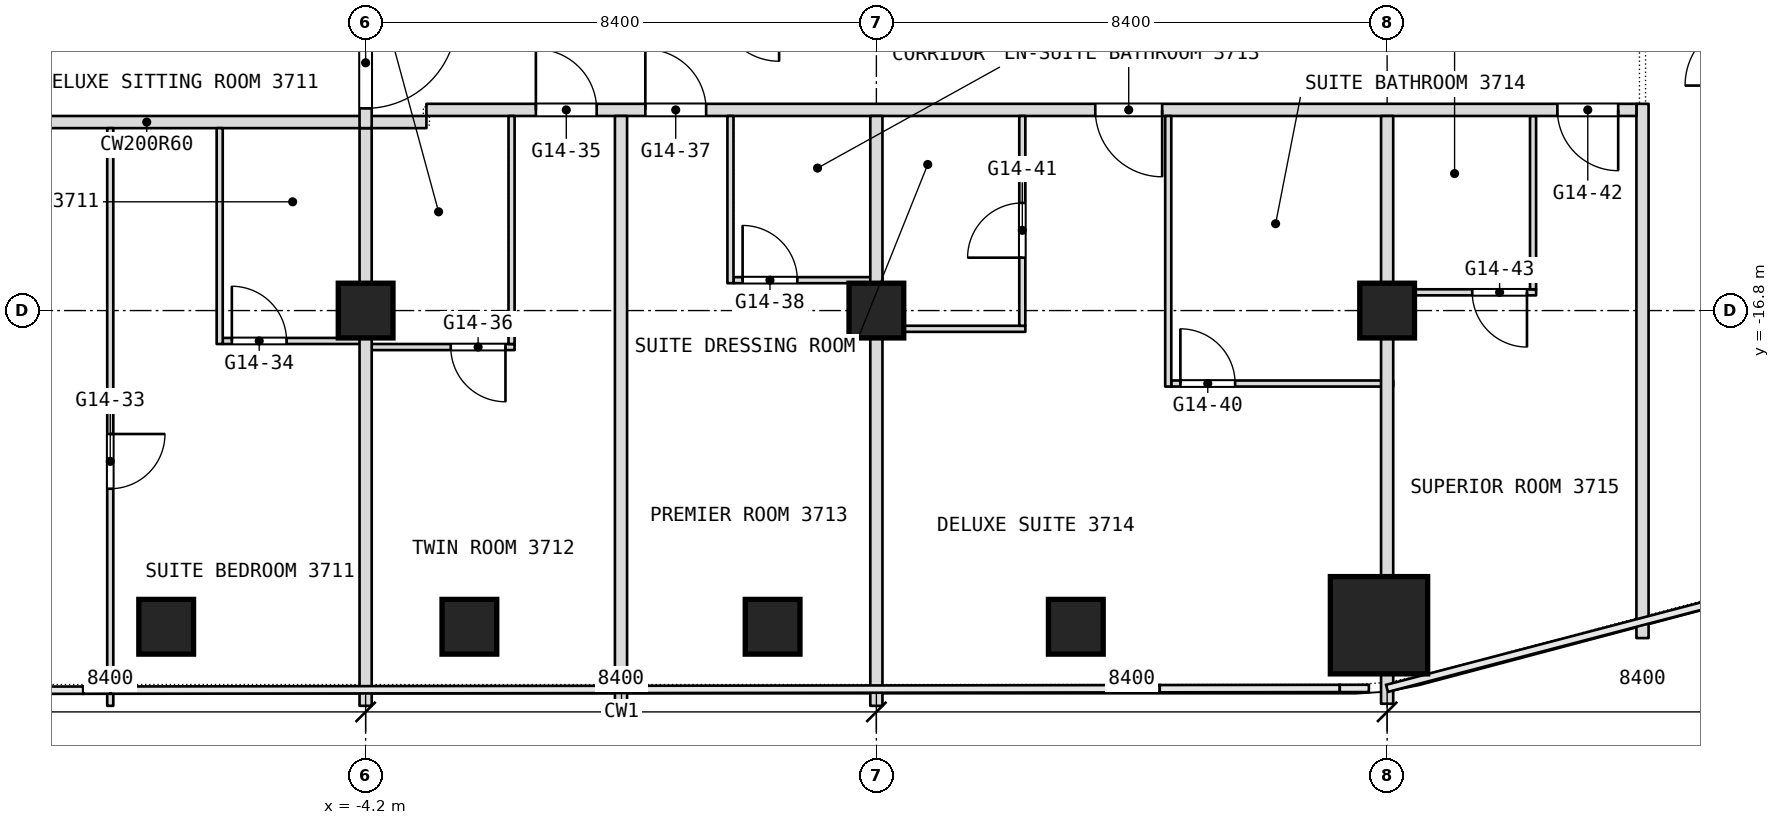
"""IFC4 building model, lengths in metres.
Left out: names, types, materials, properties, quantities, classifications, styles, units other than length and angle.
Written with IfcOpenShell. Run it as: python <this file> out.ifc"""

import sys

from ifc_helpers import new_model, si_unit, direction, frame, frame_2d, origin, origin_2d, place, context, subcontext, project, spatial, rectangle, extrude, element, fill, save


model = new_model("IFC4")
c1 = context("Model", 3, precision=1e-05, world=origin(), true_north=direction((0.0, 1.0)))
c2 = subcontext(c1, "Body", "Model", "MODEL_VIEW")
j1 = project(units=[si_unit("LENGTHUNIT", "METRE"), si_unit("PLANEANGLEUNIT", "RADIAN")], contexts=[c1])
p1 = place(None, origin())
s1 = spatial("IfcSite", under=j1, at=p1, CompositionType="ELEMENT")
p2 = place(p1, origin())
s2 = spatial("IfcBuilding", under=s1, at=p2, CompositionType="ELEMENT")
p3 = place(p2, frame((0.0, 0.0, 158.9)))
s3 = spatial("IfcBuildingStorey", under=s2, at=p3, CompositionType="ELEMENT", Elevation=158.9)
p4 = place(p3, frame((12.466, -21.975, 0.0), z_axis=(0.0, 0.0, 1.0), x_axis=(1.0, 0.0, 0.0)))
e1 = element("IfcColumn", 1, at=p4, inside=s3, PredefinedType="COLUMN", context=c2, shape_type="SweptSolid", body=[
    extrude(rectangle(XDim=1.6, YDim=1.6, at=origin_2d()), origin(), (0.0, 0.0, 1.0), 3.6),
])
for number, where, z_axis, x_axis in (
    (2, (-4.2, -16.8, 0.0), (0.0, 0.0, 1.0), (1.0, 0.0, 0.0)),
    (3, (4.2, -16.8, 0.0), (0.0, 0.0, 1.0), (1.0, 0.0, 0.0)),
    (4, (12.6, -16.8, 0.0), (0.0, 0.0, 1.0), (1.0, 0.0, 0.0)),
    (5, (7.48, -22.0, 0.0), (0.0, 0.0, 1.0), (1.0, 0.0, 0.0)),
    (6, (2.493, -22.0, 0.0), (0.0, 0.0, 1.0), (1.0, 0.0, 0.0)),
    (7, (-2.493, -22.0, 0.0), (0.0, 0.0, 1.0), (1.0, 0.0, 0.0)),
    (8, (-7.48, -22.0, 0.0), (0.0, 0.0, 1.0), (1.0, 0.0, 0.0)),
):
    element("IfcColumn", number, at=place(p3, frame(where, z_axis=z_axis, x_axis=x_axis)), inside=s3, PredefinedType="COLUMN", context=c2, shape_type="SweptSolid", body=[
        extrude(rectangle(XDim=0.9, YDim=0.9, at=origin_2d()), origin(), (0.0, 0.0, 1.0), 3.6),
    ])
p5 = place(p3, frame((9.05, -18.0, 0.0), z_axis=(0.0, 0.0, 1.0), x_axis=(1.0, 0.0, 0.0)))
e9 = element("IfcWall", 9, at=p5, inside=s3, PredefinedType="PARTITIONING", context=c2, shape_type="SweptSolid", body=[
    extrude(rectangle(XDim=3.65, YDim=0.1, at=frame_2d((1.825, 0.0))), origin(), (0.0, 0.0, 1.0), 3.34),
])
p6 = place(p5, frame((0.15, 0.0, 0.0)))
e10 = element("IfcOpeningElement", 10, at=p6, cuts=e9, PredefinedType="OPENING", context=c2, shape_type="SweptSolid", body=[
    extrude(rectangle(XDim=0.9, YDim=2.1, at=frame_2d((0.45, 1.05))), frame((0.0, 0.05, 0.0), z_axis=(0.0, -1.0, 0.0), x_axis=(1.0, 0.0, 0.0)), (0.0, 0.0, 1.0), 0.1),
])
p7 = place(p3, frame((-4.1, -17.4, 0.0), z_axis=(0.0, 0.0, 1.0), x_axis=(1.0, 0.0, 0.0)))
e11 = element("IfcWall", 11, at=p7, inside=s3, PredefinedType="PARTITIONING", context=c2, shape_type="SweptSolid", body=[
    extrude(rectangle(XDim=2.35, YDim=0.1, at=frame_2d((1.175, 0.0))), origin(), (0.0, 0.0, 1.0), 3.34),
])
p8 = place(p7, frame((1.3, 0.0, 0.0)))
e12 = element("IfcOpeningElement", 12, at=p8, cuts=e11, PredefinedType="OPENING", context=c2, shape_type="SweptSolid", body=[
    extrude(rectangle(XDim=0.9, YDim=2.1, at=frame_2d((0.45, 1.05))), frame((0.0, 0.05, 0.0), z_axis=(0.0, -1.0, 0.0), x_axis=(1.0, 0.0, 0.0)), (0.0, 0.0, 1.0), 0.1),
])
p9 = place(p3, frame((-6.55, -17.3, 0.0), z_axis=(0.0, 0.0, 1.0), x_axis=(1.0, 0.0, 0.0)))
e13 = element("IfcWall", 13, at=p9, inside=s3, PredefinedType="PARTITIONING", context=c2, shape_type="SweptSolid", body=[
    extrude(rectangle(XDim=2.45, YDim=0.1, at=frame_2d((1.225, 0.0))), origin(), (0.0, 0.0, 1.0), 3.34),
])
p10 = place(p9, frame((0.15, 0.0, 0.0)))
e14 = element("IfcOpeningElement", 14, at=p10, cuts=e13, PredefinedType="OPENING", context=c2, shape_type="SweptSolid", body=[
    extrude(rectangle(XDim=0.9, YDim=2.1, at=frame_2d((0.45, 1.05))), frame((0.0, 0.05, 0.0), z_axis=(0.0, -1.0, 0.0), x_axis=(1.0, 0.0, 0.0)), (0.0, 0.0, 1.0), 0.1),
])
p11 = place(p3, frame((4.3, -17.1, 0.0), z_axis=(0.0, 0.0, 1.0), x_axis=(1.0, 0.0, 0.0)))
e15 = element("IfcWall", 15, at=p11, inside=s3, PredefinedType="PARTITIONING", context=c2, shape_type="SweptSolid", body=[
    extrude(rectangle(XDim=2.35, YDim=0.1, at=frame_2d((1.175, 0.0))), origin(), (0.0, 0.0, 1.0), 3.34),
])
p12 = place(p3, frame((16.8, -22.186, 0.0), z_axis=(0.0, 0.0, 1.0), x_axis=(0.0, 1.0, 0.0)))
e16 = element("IfcWall", 16, at=p12, inside=s3, PredefinedType="PARTITIONING", context=c2, shape_type="SweptSolid", body=[
    extrude(rectangle(XDim=8.786, YDim=0.2, at=frame_2d((4.393, 0.0))), origin(), (0.0, 0.0, 1.0), 3.34),
])
p13 = place(p3, frame((12.7, -16.5, 0.0), z_axis=(0.0, 0.0, 1.0), x_axis=(1.0, 0.0, 0.0)))
e17 = element("IfcWall", 17, at=p13, inside=s3, PredefinedType="PARTITIONING", context=c2, shape_type="SweptSolid", body=[
    extrude(rectangle(XDim=2.35, YDim=0.1, at=frame_2d((1.175, 0.0))), origin(), (0.0, 0.0, 1.0), 3.34),
])
p14 = place(p13, frame((1.3, 0.0, 0.0)))
e18 = element("IfcOpeningElement", 18, at=p14, cuts=e17, PredefinedType="OPENING", context=c2, shape_type="SweptSolid", body=[
    extrude(rectangle(XDim=0.9, YDim=2.1, at=frame_2d((0.45, 1.05))), frame((0.0, 0.05, 0.0), z_axis=(0.0, -1.0, 0.0), x_axis=(1.0, 0.0, 0.0)), (0.0, 0.0, 1.0), 0.1),
])
p15 = place(p3, frame((1.85, -16.3, 0.0), z_axis=(0.0, 0.0, 1.0), x_axis=(1.0, 0.0, 0.0)))
e19 = element("IfcWall", 19, at=p15, inside=s3, PredefinedType="PARTITIONING", context=c2, shape_type="SweptSolid", body=[
    extrude(rectangle(XDim=2.45, YDim=0.1, at=frame_2d((1.225, 0.0))), origin(), (0.0, 0.0, 1.0), 3.34),
])
p16 = place(p15, frame((0.15, 0.0, 0.0)))
e20 = element("IfcOpeningElement", 20, at=p16, cuts=e19, PredefinedType="OPENING", context=c2, shape_type="SweptSolid", body=[
    extrude(rectangle(XDim=0.9, YDim=2.1, at=frame_2d((0.45, 1.05))), frame((0.0, 0.05, 0.0), z_axis=(0.0, -1.0, 0.0), x_axis=(1.0, 0.0, 0.0)), (0.0, 0.0, 1.0), 0.1),
])
p17 = place(p3, frame((15.0, -16.45, 0.0), z_axis=(0.0, 0.0, 1.0), x_axis=(0.0, 1.0, 0.0)))
e21 = element("IfcWall", 21, at=p17, inside=s3, PredefinedType="PARTITIONING", context=c2, shape_type="SweptSolid", body=[
    extrude(rectangle(XDim=2.85, YDim=0.1, at=frame_2d((1.425, 0.0))), origin(), (0.0, 0.0, 1.0), 3.34),
])
p18 = place(p3, frame((-12.4, -13.7, 0.0), z_axis=(0.0, 0.0, 1.0), x_axis=(1.0, 0.0, 0.0)))
e22 = element("IfcWall", 22, at=p18, inside=s3, PredefinedType="PARTITIONING", context=c2, shape_type="SweptSolid", body=[
    extrude(rectangle(XDim=9.2, YDim=0.2, at=frame_2d((4.6, 0.0))), origin(), (0.0, 0.0, 1.0), 3.34),
])
p19 = place(p18, frame((1.35, 0.0, 0.0)))
e23 = element("IfcOpeningElement", 23, at=p19, cuts=e22, PredefinedType="OPENING", context=c2, shape_type="SweptSolid", body=[
    extrude(rectangle(XDim=1.1, YDim=2.1, at=frame_2d((0.55, 1.05))), frame((0.0, 0.1, 0.0), z_axis=(0.0, -1.0, 0.0), x_axis=(1.0, 0.0, 0.0)), (0.0, 0.0, 1.0), 0.2),
])
p20 = place(p3, frame((-3.2, -13.5, 0.0), z_axis=(0.0, 0.0, 1.0), x_axis=(1.0, 0.0, 0.0)))
e24 = element("IfcWall", 24, at=p20, inside=s3, PredefinedType="PARTITIONING", context=c2, shape_type="SweptSolid", body=[
    extrude(rectangle(XDim=19.9, YDim=0.2, at=frame_2d((9.95, 0.0))), origin(), (0.0, 0.0, 1.0), 3.34),
])
p21 = place(p20, frame((1.8, 0.0, 0.0)))
e25 = element("IfcOpeningElement", 25, at=p21, cuts=e24, PredefinedType="OPENING", context=c2, shape_type="SweptSolid", body=[
    extrude(rectangle(XDim=1.0, YDim=2.1, at=frame_2d((0.5, 1.05))), frame((0.0, 0.1, 0.0), z_axis=(0.0, -1.0, 0.0), x_axis=(1.0, 0.0, 0.0)), (0.0, 0.0, 1.0), 0.2),
])
p22 = place(p20, frame((3.6, 0.0, 0.0)))
e26 = element("IfcOpeningElement", 26, at=p22, cuts=e24, PredefinedType="OPENING", context=c2, shape_type="SweptSolid", body=[
    extrude(rectangle(XDim=1.0, YDim=2.1, at=frame_2d((0.5, 1.05))), frame((0.0, 0.1, 0.0), z_axis=(0.0, -1.0, 0.0), x_axis=(1.0, 0.0, 0.0)), (0.0, 0.0, 1.0), 0.2),
])
p23 = place(p20, frame((11.0, 0.0, 0.0)))
e27 = element("IfcOpeningElement", 27, at=p23, cuts=e24, PredefinedType="OPENING", context=c2, shape_type="SweptSolid", body=[
    extrude(rectangle(XDim=1.1, YDim=2.1, at=frame_2d((0.55, 1.05))), frame((0.0, 0.1, 0.0), z_axis=(0.0, -1.0, 0.0), x_axis=(1.0, 0.0, 0.0)), (0.0, 0.0, 1.0), 0.2),
])
p24 = place(p20, frame((18.6, 0.0, 0.0)))
e28 = element("IfcOpeningElement", 28, at=p24, cuts=e24, PredefinedType="OPENING", context=c2, shape_type="SweptSolid", body=[
    extrude(rectangle(XDim=1.0, YDim=2.1, at=frame_2d((0.5, 1.05))), frame((0.0, 0.1, 0.0), z_axis=(0.0, -1.0, 0.0), x_axis=(1.0, 0.0, 0.0)), (0.0, 0.0, 1.0), 0.2),
])
p25 = place(p3, frame((12.6, -23.266, 0.0), z_axis=(0.0, 0.0, 1.0), x_axis=(0.0, 1.0, 0.0)))
e29 = element("IfcWall", 29, at=p25, inside=s3, PredefinedType="PARTITIONING", context=c2, shape_type="SweptSolid", body=[
    extrude(rectangle(XDim=0.491, YDim=0.2, at=frame_2d((0.246, 0.0))), origin(), (0.0, 0.0, 1.0), 3.34),
])
p26 = place(p3, frame((12.6, -21.175, 0.0), z_axis=(0.0, 0.0, 1.0), x_axis=(0.0, 1.0, 0.0)))
e30 = element("IfcWall", 30, at=p26, inside=s3, PredefinedType="PARTITIONING", context=c2, shape_type="SweptSolid", body=[
    extrude(rectangle(XDim=7.575, YDim=0.2, at=frame_2d((3.788, 0.0))), origin(), (0.0, 0.0, 1.0), 3.34),
])
p27 = place(p3, frame((9.0, -18.05, 0.0), z_axis=(0.0, 0.0, 1.0), x_axis=(0.0, 1.0, 0.0)))
e31 = element("IfcWall", 31, at=p27, inside=s3, PredefinedType="PARTITIONING", context=c2, shape_type="SweptSolid", body=[
    extrude(rectangle(XDim=4.45, YDim=0.1, at=frame_2d((2.225, 0.0))), origin(), (0.0, 0.0, 1.0), 3.34),
])
p28 = place(p3, frame((6.6, -17.05, 0.0), z_axis=(0.0, 0.0, 1.0), x_axis=(0.0, 1.0, 0.0)))
e32 = element("IfcWall", 32, at=p28, inside=s3, PredefinedType="PARTITIONING", context=c2, shape_type="SweptSolid", body=[
    extrude(rectangle(XDim=3.45, YDim=0.1, at=frame_2d((1.725, 0.0))), origin(), (0.0, 0.0, 1.0), 3.34),
])
p29 = place(p28, frame((1.12, 0.0, 0.0)))
e33 = element("IfcOpeningElement", 33, at=p29, cuts=e32, PredefinedType="OPENING", context=c2, shape_type="SweptSolid", body=[
    extrude(rectangle(XDim=0.9, YDim=2.1, at=frame_2d((0.45, 1.05))), frame((0.0, 0.05, 0.0), z_axis=(0.0, -1.0, 0.0), x_axis=(1.0, 0.0, 0.0)), (0.0, 0.0, 1.0), 0.1),
])
p30 = place(p3, frame((4.2, -23.3, 0.0), z_axis=(0.0, 0.0, 1.0), x_axis=(0.0, 1.0, 0.0)))
e34 = element("IfcWall", 34, at=p30, inside=s3, PredefinedType="PARTITIONING", context=c2, shape_type="SweptSolid", body=[
    extrude(rectangle(XDim=9.7, YDim=0.2, at=frame_2d((4.85, 0.0))), origin(), (0.0, 0.0, 1.0), 3.34),
])
p31 = place(p3, frame((1.8, -16.35, 0.0), z_axis=(0.0, 0.0, 1.0), x_axis=(0.0, 1.0, 0.0)))
e35 = element("IfcWall", 35, at=p31, inside=s3, PredefinedType="PARTITIONING", context=c2, shape_type="SweptSolid", body=[
    extrude(rectangle(XDim=2.75, YDim=0.1, at=frame_2d((1.375, 0.0))), origin(), (0.0, 0.0, 1.0), 3.34),
])
p32 = place(p3, frame((0.0, -23.3, 0.0), z_axis=(0.0, 0.0, 1.0), x_axis=(0.0, 1.0, 0.0)))
e36 = element("IfcWall", 36, at=p32, inside=s3, PredefinedType="PARTITIONING", context=c2, shape_type="SweptSolid", body=[
    extrude(rectangle(XDim=9.7, YDim=0.2, at=frame_2d((4.85, 0.0))), origin(), (0.0, 0.0, 1.0), 3.34),
])
p33 = place(p3, frame((-1.8, -17.35, 0.0), z_axis=(0.0, 0.0, 1.0), x_axis=(0.0, 1.0, 0.0)))
e37 = element("IfcWall", 37, at=p33, inside=s3, PredefinedType="PARTITIONING", context=c2, shape_type="SweptSolid", body=[
    extrude(rectangle(XDim=3.75, YDim=0.1, at=frame_2d((1.875, 0.0))), origin(), (0.0, 0.0, 1.0), 3.34),
])
p34 = place(p3, frame((-4.2, -23.3, 0.0), z_axis=(0.0, 0.0, 1.0), x_axis=(0.0, 1.0, 0.0)))
e38 = element("IfcWall", 38, at=p34, inside=s3, PredefinedType="PARTITIONING", context=c2, shape_type="SweptSolid", body=[
    extrude(rectangle(XDim=9.5, YDim=0.2, at=frame_2d((4.75, 0.0))), origin(), (0.0, 0.0, 1.0), 3.34),
])
p35 = place(p3, frame((-4.2, -13.8, 0.0), z_axis=(0.0, 0.0, 1.0), x_axis=(0.0, 1.0, 0.0)))
e39 = element("IfcWall", 39, at=p35, inside=s3, PredefinedType="PARTITIONING", context=c2, shape_type="SweptSolid", body=[
    extrude(rectangle(XDim=13.8, YDim=0.2, at=frame_2d((6.9, 0.0))), origin(), (0.0, 0.0, 1.0), 3.34),
])
p36 = place(p35, frame((12.15, 0.0, 0.0)))
e40 = element("IfcOpeningElement", 40, at=p36, cuts=e39, PredefinedType="OPENING", context=c2, shape_type="SweptSolid", body=[
    extrude(rectangle(XDim=1.5, YDim=2.1, at=frame_2d((0.75, 1.05))), frame((0.0, 0.1, 0.0), z_axis=(0.0, -1.0, 0.0), x_axis=(1.0, 0.0, 0.0)), (0.0, 0.0, 1.0), 0.2),
])
p37 = place(p35, frame((0.325, 0.0, 0.0)))
e41 = element("IfcOpeningElement", 41, at=p37, cuts=e39, PredefinedType="OPENING", context=c2, shape_type="SweptSolid", body=[
    extrude(rectangle(XDim=1.5, YDim=2.1, at=frame_2d((0.75, 1.05))), frame((0.0, 0.1, 0.0), z_axis=(0.0, -1.0, 0.0), x_axis=(1.0, 0.0, 0.0)), (0.0, 0.0, 1.0), 0.2),
])
p38 = place(p3, frame((-6.6, -17.35, 0.0), z_axis=(0.0, 0.0, 1.0), x_axis=(0.0, 1.0, 0.0)))
e42 = element("IfcWall", 42, at=p38, inside=s3, PredefinedType="PARTITIONING", context=c2, shape_type="SweptSolid", body=[
    extrude(rectangle(XDim=3.55, YDim=0.1, at=frame_2d((1.775, 0.0))), origin(), (0.0, 0.0, 1.0), 3.34),
])
p39 = place(p3, frame((-8.4, -23.3, 0.0), z_axis=(0.0, 0.0, 1.0), x_axis=(0.0, 1.0, 0.0)))
e43 = element("IfcWall", 43, at=p39, inside=s3, PredefinedType="PARTITIONING", context=c2, shape_type="SweptSolid", body=[
    extrude(rectangle(XDim=9.5, YDim=0.1, at=frame_2d((4.75, 0.0))), origin(), (0.0, 0.0, 1.0), 3.34),
])
p40 = place(p39, frame((3.57, 0.0, 0.0)))
e44 = element("IfcOpeningElement", 44, at=p40, cuts=e43, PredefinedType="OPENING", context=c2, shape_type="SweptSolid", body=[
    extrude(rectangle(XDim=0.9, YDim=2.1, at=frame_2d((0.45, 1.05))), frame((0.0, 0.05, 0.0), z_axis=(0.0, -1.0, 0.0), x_axis=(1.0, 0.0, 0.0)), (0.0, 0.0, 1.0), 0.1),
])
p41 = place(p6, origin())
e45 = element("IfcDoor", 45, at=p41, inside=s3, OperationType="SINGLE_SWING_LEFT", PredefinedType="DOOR", context=c2, shape_type="SweptSolid", body=[
    extrude(rectangle(XDim=0.9, YDim=2.1, at=frame_2d((0.45, 1.05))), frame((0.0, 0.025, 0.0), z_axis=(0.0, -1.0, 0.0), x_axis=(1.0, 0.0, 0.0)), (0.0, 0.0, 1.0), 0.05),
])
fill(e10, e45)
p42 = place(p8, origin())
e46 = element("IfcDoor", 46, at=p42, inside=s3, OperationType="SINGLE_SWING_RIGHT", PredefinedType="DOOR", context=c2, shape_type="SweptSolid", body=[
    extrude(rectangle(XDim=0.9, YDim=2.1, at=frame_2d((0.45, 1.05))), frame((0.0, 0.025, 0.0), z_axis=(0.0, -1.0, 0.0), x_axis=(1.0, 0.0, 0.0)), (0.0, 0.0, 1.0), 0.05),
])
fill(e12, e46)
p43 = place(p10, origin())
e47 = element("IfcDoor", 47, at=p43, inside=s3, OperationType="SINGLE_SWING_LEFT", PredefinedType="DOOR", context=c2, shape_type="SweptSolid", body=[
    extrude(rectangle(XDim=0.9, YDim=2.1, at=frame_2d((0.45, 1.05))), frame((0.0, 0.025, 0.0), z_axis=(0.0, -1.0, 0.0), x_axis=(1.0, 0.0, 0.0)), (0.0, 0.0, 1.0), 0.05),
])
fill(e14, e47)
p44 = place(p14, origin())
e48 = element("IfcDoor", 48, at=p44, inside=s3, OperationType="SINGLE_SWING_RIGHT", PredefinedType="DOOR", context=c2, shape_type="SweptSolid", body=[
    extrude(rectangle(XDim=0.9, YDim=2.1, at=frame_2d((0.45, 1.05))), frame((0.0, 0.025, 0.0), z_axis=(0.0, -1.0, 0.0), x_axis=(1.0, 0.0, 0.0)), (0.0, 0.0, 1.0), 0.05),
])
fill(e18, e48)
p45 = place(p16, origin())
e49 = element("IfcDoor", 49, at=p45, inside=s3, OperationType="SINGLE_SWING_LEFT", PredefinedType="DOOR", context=c2, shape_type="SweptSolid", body=[
    extrude(rectangle(XDim=0.9, YDim=2.1, at=frame_2d((0.45, 1.05))), frame((0.0, 0.025, 0.0), z_axis=(0.0, -1.0, 0.0), x_axis=(1.0, 0.0, 0.0)), (0.0, 0.0, 1.0), 0.05),
])
fill(e20, e49)
p46 = place(p21, origin())
e50 = element("IfcDoor", 50, at=p46, inside=s3, OperationType="SINGLE_SWING_LEFT", PredefinedType="DOOR", context=c2, shape_type="SweptSolid", body=[
    extrude(rectangle(XDim=1.0, YDim=2.1, at=frame_2d((0.5, 1.05))), frame((0.0, 0.025, 0.0), z_axis=(0.0, -1.0, 0.0), x_axis=(1.0, 0.0, 0.0)), (0.0, 0.0, 1.0), 0.05),
])
fill(e25, e50)
p47 = place(p22, origin())
e51 = element("IfcDoor", 51, at=p47, inside=s3, OperationType="SINGLE_SWING_LEFT", PredefinedType="DOOR", context=c2, shape_type="SweptSolid", body=[
    extrude(rectangle(XDim=1.0, YDim=2.1, at=frame_2d((0.5, 1.05))), frame((0.0, 0.025, 0.0), z_axis=(0.0, -1.0, 0.0), x_axis=(1.0, 0.0, 0.0)), (0.0, 0.0, 1.0), 0.05),
])
fill(e26, e51)
p48 = place(p23, origin())
e52 = element("IfcDoor", 52, at=p48, inside=s3, OperationType="SINGLE_SWING_LEFT", PredefinedType="DOOR", context=c2, shape_type="SweptSolid", body=[
    extrude(rectangle(XDim=1.1, YDim=2.1, at=frame_2d((0.55, 1.05))), frame((0.0, 0.025, 0.0), z_axis=(0.0, -1.0, 0.0), x_axis=(1.0, 0.0, 0.0)), (0.0, 0.0, 1.0), 0.05),
])
fill(e27, e52)
p49 = place(p24, origin())
e53 = element("IfcDoor", 53, at=p49, inside=s3, OperationType="SINGLE_SWING_LEFT", PredefinedType="DOOR", context=c2, shape_type="SweptSolid", body=[
    extrude(rectangle(XDim=1.0, YDim=2.1, at=frame_2d((0.5, 1.05))), frame((0.0, 0.025, 0.0), z_axis=(0.0, -1.0, 0.0), x_axis=(1.0, 0.0, 0.0)), (0.0, 0.0, 1.0), 0.05),
])
fill(e28, e53)
p50 = place(p29, origin())
e54 = element("IfcDoor", 54, at=p50, inside=s3, OperationType="SINGLE_SWING_LEFT", PredefinedType="DOOR", context=c2, shape_type="SweptSolid", body=[
    extrude(rectangle(XDim=0.9, YDim=2.1, at=frame_2d((0.45, 1.05))), frame((0.0, 0.025, 0.0), z_axis=(0.0, -1.0, 0.0), x_axis=(1.0, 0.0, 0.0)), (0.0, 0.0, 1.0), 0.05),
])
fill(e33, e54)
p51 = place(p40, origin())
e55 = element("IfcDoor", 55, at=p51, inside=s3, OperationType="SINGLE_SWING_RIGHT", PredefinedType="DOOR", context=c2, shape_type="SweptSolid", body=[
    extrude(rectangle(XDim=0.9, YDim=2.1, at=frame_2d((0.45, 1.05))), frame((0.0, 0.025, 0.0), z_axis=(0.0, -1.0, 0.0), x_axis=(1.0, 0.0, 0.0)), (0.0, 0.0, 1.0), 0.05),
])
fill(e44, e55)
p52 = place(p37, origin())
e56 = element("IfcDoor", 56, at=p52, inside=s3, OperationType="DOUBLE_DOOR_DOUBLE_SWING", PredefinedType="DOOR", context=c2, shape_type="SweptSolid", body=[
    extrude(rectangle(XDim=1.5, YDim=2.1, at=frame_2d((0.75, 1.05))), frame((0.0, 0.025, 0.0), z_axis=(0.0, -1.0, 0.0), x_axis=(1.0, 0.0, 0.0)), (0.0, 0.0, 1.0), 0.05),
])
fill(e41, e56)
save(model, sys.argv[1])
